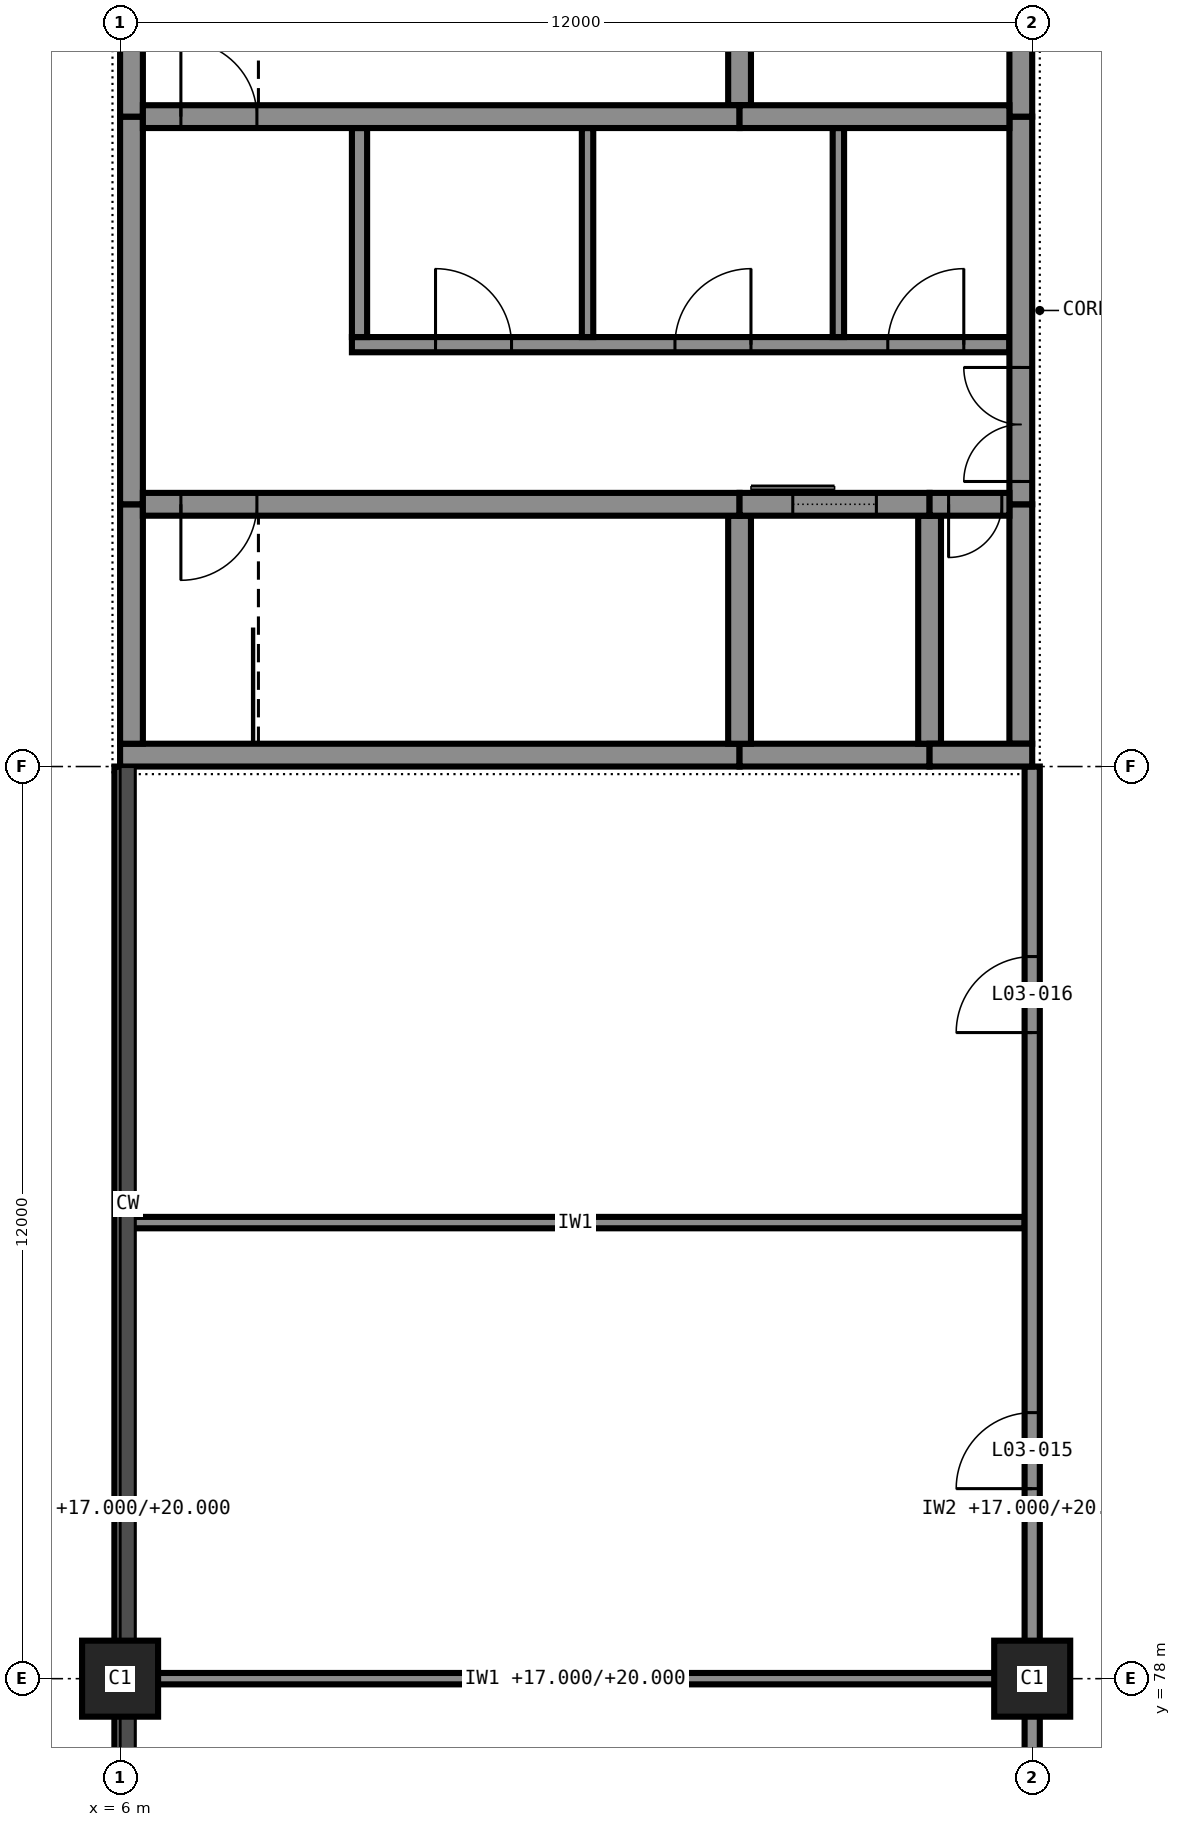
"""IFC4 building model, lengths in metres.
Left out: names, types, materials, properties, quantities, classifications, styles, units other than length and angle.
Written with IfcOpenShell. Run it as: python <this file> out.ifc"""

import sys

from ifc_helpers import new_model, si_unit, direction, frame, frame_2d, origin, origin_2d, place, context, subcontext, project, spatial, rectangle, extrude, element, fill, save


model = new_model("IFC4")
c1 = context("Model", 3, precision=1e-05, world=origin(), true_north=direction((0.0, 1.0)))
c2 = subcontext(c1, "Body", "Model", "MODEL_VIEW")
j1 = project(units=[si_unit("LENGTHUNIT", "METRE"), si_unit("PLANEANGLEUNIT", "RADIAN")], contexts=[c1])
p1 = place(None, origin())
s1 = spatial("IfcSite", under=j1, at=p1, CompositionType="ELEMENT")
p2 = place(p1, origin())
s2 = spatial("IfcBuilding", under=s1, at=p2, CompositionType="ELEMENT")
p3 = place(p2, frame((0.0, 0.0, 17.0)))
s3 = spatial("IfcBuildingStorey", under=s2, at=p3, CompositionType="ELEMENT", Elevation=17.0)
for number, where, z_axis, x_axis in (
    (1, (6.0, 78.0, 0.0), (0.0, 0.0, 1.0), (1.0, 0.0, 0.0)),
    (2, (18.0, 78.0, 0.0), (0.0, 0.0, 1.0), (1.0, 0.0, 0.0)),
):
    element("IfcColumn", number, at=place(p3, frame(where, z_axis=z_axis, x_axis=x_axis)), inside=s3, PredefinedType="COLUMN", context=c2, shape_type="SweptSolid", body=[
        extrude(rectangle(XDim=1.0, YDim=1.0, at=origin_2d()), origin(), (0.0, 0.0, 1.0), 4.0),
    ])
p4 = place(p3, frame((6.0, 90.15, 0.0), z_axis=(0.0, 0.0, 1.0), x_axis=(1.0, 0.0, 0.0)))
e3 = element("IfcWall", 3, at=p4, inside=s3, PredefinedType="SHEAR", context=c2, shape_type="SweptSolid", body=[
    extrude(rectangle(XDim=8.15, YDim=0.3, at=frame_2d((4.075, 0.0))), origin(), (0.0, 0.0, 1.0), 3.8),
])
p5 = place(p3, frame((14.15, 90.15, 0.0), z_axis=(0.0, 0.0, 1.0), x_axis=(1.0, 0.0, 0.0)))
e4 = element("IfcWall", 4, at=p5, inside=s3, PredefinedType="SHEAR", context=c2, shape_type="SweptSolid", body=[
    extrude(rectangle(XDim=2.5, YDim=0.3, at=frame_2d((1.25, 0.0))), origin(), (0.0, 0.0, 1.0), 3.8),
])
p6 = place(p3, frame((16.65, 90.15, 0.0), z_axis=(0.0, 0.0, 1.0), x_axis=(1.0, 0.0, 0.0)))
e5 = element("IfcWall", 5, at=p6, inside=s3, PredefinedType="SHEAR", context=c2, shape_type="SweptSolid", body=[
    extrude(rectangle(XDim=1.35, YDim=0.3, at=frame_2d((0.675, 0.0))), origin(), (0.0, 0.0, 1.0), 3.8),
])
p7 = place(p3, frame((6.3, 93.45, 0.0), z_axis=(0.0, 0.0, 1.0), x_axis=(1.0, 0.0, 0.0)))
e6 = element("IfcWall", 6, at=p7, inside=s3, PredefinedType="SHEAR", context=c2, shape_type="SweptSolid", body=[
    extrude(rectangle(XDim=7.85, YDim=0.3, at=frame_2d((3.925, 0.0))), origin(), (0.0, 0.0, 1.0), 3.8),
])
p8 = place(p7, frame((0.5, 0.0, 0.0)))
e7 = element("IfcOpeningElement", 7, at=p8, cuts=e6, PredefinedType="OPENING", context=c2, shape_type="SweptSolid", body=[
    extrude(rectangle(XDim=1.0, YDim=2.1, at=frame_2d((0.5, 1.05))), frame((0.0, 0.16, 0.0), z_axis=(0.0, -1.0, 0.0), x_axis=(1.0, 0.0, 0.0)), (0.0, 0.0, 1.0), 0.32),
])
p9 = place(p3, frame((14.15, 93.45, 0.0), z_axis=(0.0, 0.0, 1.0), x_axis=(1.0, 0.0, 0.0)))
e8 = element("IfcWall", 8, at=p9, inside=s3, PredefinedType="SHEAR", context=c2, shape_type="SweptSolid", body=[
    extrude(rectangle(XDim=2.5, YDim=0.3, at=frame_2d((1.25, 0.0))), origin(), (0.0, 0.0, 1.0), 3.8),
])
p10 = place(p9, frame((0.7, 0.0, 0.0)))
e9 = element("IfcOpeningElement", 9, at=p10, cuts=e8, PredefinedType="OPENING", context=c2, shape_type="SweptSolid", body=[
    extrude(rectangle(XDim=1.1, YDim=2.1, at=frame_2d((0.55, 1.05))), frame((0.0, 0.16, 0.0), z_axis=(0.0, -1.0, 0.0), x_axis=(1.0, 0.0, 0.0)), (0.0, 0.0, 1.0), 0.32),
])
p11 = place(p3, frame((16.65, 93.45, 0.0), z_axis=(0.0, 0.0, 1.0), x_axis=(1.0, 0.0, 0.0)))
e10 = element("IfcWall", 10, at=p11, inside=s3, PredefinedType="SHEAR", context=c2, shape_type="SweptSolid", body=[
    extrude(rectangle(XDim=1.05, YDim=0.3, at=frame_2d((0.525, 0.0))), origin(), (0.0, 0.0, 1.0), 3.8),
])
p12 = place(p11, frame((0.25, 0.0, 0.0)))
e11 = element("IfcOpeningElement", 11, at=p12, cuts=e10, PredefinedType="OPENING", context=c2, shape_type="SweptSolid", body=[
    extrude(rectangle(XDim=0.7, YDim=2.1, at=frame_2d((0.35, 1.05))), frame((0.0, 0.16, 0.0), z_axis=(0.0, -1.0, 0.0), x_axis=(1.0, 0.0, 0.0)), (0.0, 0.0, 1.0), 0.32),
])
p13 = place(p3, frame((6.3, 98.55, 0.0), z_axis=(0.0, 0.0, 1.0), x_axis=(1.0, 0.0, 0.0)))
e12 = element("IfcWall", 12, at=p13, inside=s3, PredefinedType="SHEAR", context=c2, shape_type="SweptSolid", body=[
    extrude(rectangle(XDim=7.85, YDim=0.3, at=frame_2d((3.925, 0.0))), origin(), (0.0, 0.0, 1.0), 3.8),
])
p14 = place(p13, frame((0.5, 0.0, 0.0)))
e13 = element("IfcOpeningElement", 13, at=p14, cuts=e12, PredefinedType="OPENING", context=c2, shape_type="SweptSolid", body=[
    extrude(rectangle(XDim=1.0, YDim=2.1, at=frame_2d((0.5, 1.05))), frame((0.0, 0.16, 0.0), z_axis=(0.0, -1.0, 0.0), x_axis=(1.0, 0.0, 0.0)), (0.0, 0.0, 1.0), 0.32),
])
p15 = place(p3, frame((14.15, 98.55, 0.0), z_axis=(0.0, 0.0, 1.0), x_axis=(1.0, 0.0, 0.0)))
e14 = element("IfcWall", 14, at=p15, inside=s3, PredefinedType="SHEAR", context=c2, shape_type="SweptSolid", body=[
    extrude(rectangle(XDim=3.55, YDim=0.3, at=frame_2d((1.775, 0.0))), origin(), (0.0, 0.0, 1.0), 3.8),
])
p16 = place(p3, frame((6.15, 90.3, 0.0), z_axis=(0.0, 0.0, 1.0), x_axis=(0.0, 1.0, 0.0)))
e15 = element("IfcWall", 15, at=p16, inside=s3, PredefinedType="SHEAR", context=c2, shape_type="SweptSolid", body=[
    extrude(rectangle(XDim=3.15, YDim=0.3, at=frame_2d((1.575, 0.0))), origin(), (0.0, 0.0, 1.0), 3.8),
])
p17 = place(p3, frame((6.15, 93.45, 0.0), z_axis=(0.0, 0.0, 1.0), x_axis=(0.0, 1.0, 0.0)))
e16 = element("IfcWall", 16, at=p17, inside=s3, PredefinedType="SHEAR", context=c2, shape_type="SweptSolid", body=[
    extrude(rectangle(XDim=5.1, YDim=0.3, at=frame_2d((2.55, 0.0))), origin(), (0.0, 0.0, 1.0), 3.8),
])
p18 = place(p3, frame((6.15, 98.55, 0.0), z_axis=(0.0, 0.0, 1.0), x_axis=(0.0, 1.0, 0.0)))
e17 = element("IfcWall", 17, at=p18, inside=s3, PredefinedType="SHEAR", context=c2, shape_type="SweptSolid", body=[
    extrude(rectangle(XDim=3.45, YDim=0.3, at=frame_2d((1.725, 0.0))), origin(), (0.0, 0.0, 1.0), 3.8),
])
p19 = place(p3, frame((17.85, 90.3, 0.0), z_axis=(0.0, 0.0, 1.0), x_axis=(0.0, 1.0, 0.0)))
e18 = element("IfcWall", 18, at=p19, inside=s3, PredefinedType="SHEAR", context=c2, shape_type="SweptSolid", body=[
    extrude(rectangle(XDim=3.15, YDim=0.3, at=frame_2d((1.575, 0.0))), origin(), (0.0, 0.0, 1.0), 3.8),
])
p20 = place(p3, frame((17.85, 93.45, 0.0), z_axis=(0.0, 0.0, 1.0), x_axis=(0.0, 1.0, 0.0)))
e19 = element("IfcWall", 19, at=p20, inside=s3, PredefinedType="SHEAR", context=c2, shape_type="SweptSolid", body=[
    extrude(rectangle(XDim=5.1, YDim=0.3, at=frame_2d((2.55, 0.0))), origin(), (0.0, 0.0, 1.0), 3.8),
])
p21 = place(p20, frame((0.3, 0.0, 0.0)))
e20 = element("IfcOpeningElement", 20, at=p21, cuts=e19, PredefinedType="OPENING", context=c2, shape_type="SweptSolid", body=[
    extrude(rectangle(XDim=1.5, YDim=2.1, at=frame_2d((0.75, 1.05))), frame((0.0, 0.16, 0.0), z_axis=(0.0, -1.0, 0.0), x_axis=(1.0, 0.0, 0.0)), (0.0, 0.0, 1.0), 0.32),
])
p22 = place(p3, frame((17.85, 98.55, 0.0), z_axis=(0.0, 0.0, 1.0), x_axis=(0.0, 1.0, 0.0)))
e21 = element("IfcWall", 21, at=p22, inside=s3, PredefinedType="SHEAR", context=c2, shape_type="SweptSolid", body=[
    extrude(rectangle(XDim=3.15, YDim=0.3, at=frame_2d((1.575, 0.0))), origin(), (0.0, 0.0, 1.0), 3.8),
])
p23 = place(p22, frame((1.15, 0.0, 0.0)))
e22 = element("IfcOpeningElement", 22, at=p23, cuts=e21, PredefinedType="OPENING", context=c2, shape_type="SweptSolid", body=[
    extrude(rectangle(XDim=1.0, YDim=2.1, at=frame_2d((0.5, 1.05))), frame((0.0, 0.16, 0.0), z_axis=(0.0, -1.0, 0.0), x_axis=(1.0, 0.0, 0.0)), (0.0, 0.0, 1.0), 0.32),
])
p24 = place(p3, frame((14.15, 90.3, 0.0), z_axis=(0.0, 0.0, 1.0), x_axis=(0.0, 1.0, 0.0)))
e23 = element("IfcWall", 23, at=p24, inside=s3, PredefinedType="SHEAR", context=c2, shape_type="SweptSolid", body=[
    extrude(rectangle(XDim=3.0, YDim=0.3, at=frame_2d((1.5, 0.0))), origin(), (0.0, 0.0, 1.0), 3.8),
])
p25 = place(p3, frame((14.15, 98.7, 0.0), z_axis=(0.0, 0.0, 1.0), x_axis=(0.0, 1.0, 0.0)))
e24 = element("IfcWall", 24, at=p25, inside=s3, PredefinedType="SHEAR", context=c2, shape_type="SweptSolid", body=[
    extrude(rectangle(XDim=3.3, YDim=0.3, at=frame_2d((1.65, 0.0))), origin(), (0.0, 0.0, 1.0), 3.8),
])
p26 = place(p3, frame((16.65, 90.3, 0.0), z_axis=(0.0, 0.0, 1.0), x_axis=(0.0, 1.0, 0.0)))
e25 = element("IfcWall", 25, at=p26, inside=s3, PredefinedType="SHEAR", context=c2, shape_type="SweptSolid", body=[
    extrude(rectangle(XDim=3.0, YDim=0.3, at=frame_2d((1.5, 0.0))), origin(), (0.0, 0.0, 1.0), 3.8),
])
p27 = place(p3, frame((6.075, 78.0, 0.0), z_axis=(0.0, 0.0, 1.0), x_axis=(1.0, 0.0, 0.0)))
e26 = element("IfcWall", 26, at=p27, inside=s3, PredefinedType="PARTITIONING", context=c2, shape_type="SweptSolid", body=[
    extrude(rectangle(XDim=11.825, YDim=0.15, at=frame_2d((5.913, 0.0))), origin(), (0.0, 0.0, 1.0), 3.0),
])
p28 = place(p3, frame((6.075, 84.0, 0.0), z_axis=(0.0, 0.0, 1.0), x_axis=(1.0, 0.0, 0.0)))
e27 = element("IfcWall", 27, at=p28, inside=s3, PredefinedType="PARTITIONING", context=c2, shape_type="SweptSolid", body=[
    extrude(rectangle(XDim=11.825, YDim=0.15, at=frame_2d((5.913, 0.0))), origin(), (0.0, 0.0, 1.0), 3.8),
])
p29 = place(p3, frame((9.05, 95.55, 0.0), z_axis=(0.0, 0.0, 1.0), x_axis=(1.0, 0.0, 0.0)))
e28 = element("IfcWall", 28, at=p29, inside=s3, PredefinedType="PARTITIONING", context=c2, shape_type="SweptSolid", body=[
    extrude(rectangle(XDim=8.65, YDim=0.2, at=frame_2d((4.325, 0.0))), origin(), (0.0, 0.0, 1.0), 3.8),
])
p30 = place(p29, frame((1.1, 0.0, 0.0)))
e29 = element("IfcOpeningElement", 29, at=p30, cuts=e28, PredefinedType="OPENING", context=c2, shape_type="SweptSolid", body=[
    extrude(rectangle(XDim=1.0, YDim=2.1, at=frame_2d((0.5, 1.05))), frame((0.0, 0.11, 0.0), z_axis=(0.0, -1.0, 0.0), x_axis=(1.0, 0.0, 0.0)), (0.0, 0.0, 1.0), 0.22),
])
p31 = place(p29, frame((4.25, 0.0, 0.0)))
e30 = element("IfcOpeningElement", 30, at=p31, cuts=e28, PredefinedType="OPENING", context=c2, shape_type="SweptSolid", body=[
    extrude(rectangle(XDim=1.0, YDim=2.1, at=frame_2d((0.5, 1.05))), frame((0.0, 0.11, 0.0), z_axis=(0.0, -1.0, 0.0), x_axis=(1.0, 0.0, 0.0)), (0.0, 0.0, 1.0), 0.22),
])
p32 = place(p29, frame((7.05, 0.0, 0.0)))
e31 = element("IfcOpeningElement", 31, at=p32, cuts=e28, PredefinedType="OPENING", context=c2, shape_type="SweptSolid", body=[
    extrude(rectangle(XDim=1.0, YDim=2.1, at=frame_2d((0.5, 1.05))), frame((0.0, 0.11, 0.0), z_axis=(0.0, -1.0, 0.0), x_axis=(1.0, 0.0, 0.0)), (0.0, 0.0, 1.0), 0.22),
])
p33 = place(p3, frame((6.0, 54.0, 0.0), z_axis=(0.0, 0.0, 1.0), x_axis=(0.0, 1.0, 0.0)))
e32 = element("IfcWall", 32, at=p33, inside=s3, PredefinedType="PARTITIONING", context=c2, shape_type="SweptSolid", body=[
    extrude(rectangle(XDim=36.0, YDim=0.15, at=frame_2d((18.0, 0.0))), origin(), (0.0, 0.0, 1.0), 3.0),
])
p34 = place(p3, frame((9.15, 95.65, 0.0), z_axis=(0.0, 0.0, 1.0), x_axis=(0.0, 1.0, 0.0)))
e33 = element("IfcWall", 33, at=p34, inside=s3, PredefinedType="PARTITIONING", context=c2, shape_type="SweptSolid", body=[
    extrude(rectangle(XDim=2.75, YDim=0.2, at=frame_2d((1.375, 0.0))), origin(), (0.0, 0.0, 1.0), 3.8),
])
for number, where, z_axis, x_axis in (
    (34, (12.15, 95.65, 0.0), (0.0, 0.0, 1.0), (0.0, 1.0, 0.0)),
    (35, (15.45, 95.65, 0.0), (0.0, 0.0, 1.0), (0.0, 1.0, 0.0)),
):
    element("IfcWall", number, at=place(p3, frame(where, z_axis=z_axis, x_axis=x_axis)), inside=s3, PredefinedType="PARTITIONING", context=c2, shape_type="SweptSolid", body=[
        extrude(rectangle(XDim=2.75, YDim=0.15, at=frame_2d((1.375, 0.0))), origin(), (0.0, 0.0, 1.0), 3.8),
    ])
p35 = place(p3, frame((18.0, 54.0, 0.0), z_axis=(0.0, 0.0, 1.0), x_axis=(0.0, 1.0, 0.0)))
e36 = element("IfcWall", 36, at=p35, inside=s3, PredefinedType="PARTITIONING", context=c2, shape_type="SweptSolid", body=[
    extrude(rectangle(XDim=36.0, YDim=0.2, at=frame_2d((18.0, 0.0))), origin(), (0.0, 0.0, 1.0), 3.0),
])
p36 = place(p35, frame((2.5, 0.0, 0.0)))
e37 = element("IfcOpeningElement", 37, at=p36, cuts=e36, PredefinedType="OPENING", context=c2, shape_type="SweptSolid", body=[
    extrude(rectangle(XDim=1.0, YDim=2.1, at=frame_2d((0.5, 1.05))), frame((0.0, 0.11, 0.0), z_axis=(0.0, -1.0, 0.0), x_axis=(1.0, 0.0, 0.0)), (0.0, 0.0, 1.0), 0.22),
])
p37 = place(p35, frame((8.5, 0.0, 0.0)))
e38 = element("IfcOpeningElement", 38, at=p37, cuts=e36, PredefinedType="OPENING", context=c2, shape_type="SweptSolid", body=[
    extrude(rectangle(XDim=1.0, YDim=2.1, at=frame_2d((0.5, 1.05))), frame((0.0, 0.11, 0.0), z_axis=(0.0, -1.0, 0.0), x_axis=(1.0, 0.0, 0.0)), (0.0, 0.0, 1.0), 0.22),
])
p38 = place(p35, frame((14.5, 0.0, 0.0)))
e39 = element("IfcOpeningElement", 39, at=p38, cuts=e36, PredefinedType="OPENING", context=c2, shape_type="SweptSolid", body=[
    extrude(rectangle(XDim=1.0, YDim=2.1, at=frame_2d((0.5, 1.05))), frame((0.0, 0.11, 0.0), z_axis=(0.0, -1.0, 0.0), x_axis=(1.0, 0.0, 0.0)), (0.0, 0.0, 1.0), 0.22),
])
p39 = place(p35, frame((20.5, 0.0, 0.0)))
e40 = element("IfcOpeningElement", 40, at=p39, cuts=e36, PredefinedType="OPENING", context=c2, shape_type="SweptSolid", body=[
    extrude(rectangle(XDim=1.0, YDim=2.1, at=frame_2d((0.5, 1.05))), frame((0.0, 0.11, 0.0), z_axis=(0.0, -1.0, 0.0), x_axis=(1.0, 0.0, 0.0)), (0.0, 0.0, 1.0), 0.22),
])
p40 = place(p35, frame((26.5, 0.0, 0.0)))
e41 = element("IfcOpeningElement", 41, at=p40, cuts=e36, PredefinedType="OPENING", context=c2, shape_type="SweptSolid", body=[
    extrude(rectangle(XDim=1.0, YDim=2.1, at=frame_2d((0.5, 1.05))), frame((0.0, 0.11, 0.0), z_axis=(0.0, -1.0, 0.0), x_axis=(1.0, 0.0, 0.0)), (0.0, 0.0, 1.0), 0.22),
])
p41 = place(p35, frame((32.5, 0.0, 0.0)))
e42 = element("IfcOpeningElement", 42, at=p41, cuts=e36, PredefinedType="OPENING", context=c2, shape_type="SweptSolid", body=[
    extrude(rectangle(XDim=1.0, YDim=2.1, at=frame_2d((0.5, 1.05))), frame((0.0, 0.11, 0.0), z_axis=(0.0, -1.0, 0.0), x_axis=(1.0, 0.0, 0.0)), (0.0, 0.0, 1.0), 0.22),
])
p42 = place(p40, origin())
e43 = element("IfcDoor", 43, at=p42, inside=s3, OperationType="SINGLE_SWING_RIGHT", PredefinedType="DOOR", context=c2, shape_type="SweptSolid", body=[
    extrude(rectangle(XDim=1.0, YDim=2.1, at=frame_2d((0.5, 1.05))), frame((0.0, 0.025, 0.0), z_axis=(0.0, -1.0, 0.0), x_axis=(1.0, 0.0, 0.0)), (0.0, 0.0, 1.0), 0.05),
])
fill(e41, e43)
p43 = place(p41, origin())
e44 = element("IfcDoor", 44, at=p43, inside=s3, OperationType="SINGLE_SWING_RIGHT", PredefinedType="DOOR", context=c2, shape_type="SweptSolid", body=[
    extrude(rectangle(XDim=1.0, YDim=2.1, at=frame_2d((0.5, 1.05))), frame((0.0, 0.025, 0.0), z_axis=(0.0, -1.0, 0.0), x_axis=(1.0, 0.0, 0.0)), (0.0, 0.0, 1.0), 0.05),
])
fill(e42, e44)
p44 = place(p8, frame((1.0, 0.0, 0.0), z_axis=(0.0, 0.0, 1.0), x_axis=(-1.0, 0.0, 0.0)))
e45 = element("IfcDoor", 45, at=p44, inside=s3, OperationType="SINGLE_SWING_LEFT", PredefinedType="DOOR", context=c2, shape_type="SweptSolid", body=[
    extrude(rectangle(XDim=1.0, YDim=2.1, at=frame_2d((0.5, 1.05))), frame((0.0, 0.025, 0.0), z_axis=(0.0, -1.0, 0.0), x_axis=(1.0, 0.0, 0.0)), (0.0, 0.0, 1.0), 0.05),
])
fill(e7, e45)
p45 = place(p10, origin())
e46 = element("IfcDoor", 46, at=p45, inside=s3, OperationType="SLIDING_TO_LEFT", PredefinedType="DOOR", context=c2, shape_type="SweptSolid", body=[
    extrude(rectangle(XDim=1.1, YDim=2.1, at=frame_2d((0.55, 1.05))), frame((0.0, 0.025, 0.0), z_axis=(0.0, -1.0, 0.0), x_axis=(1.0, 0.0, 0.0)), (0.0, 0.0, 1.0), 0.05),
])
fill(e9, e46)
p46 = place(p12, frame((0.7, 0.0, 0.0), z_axis=(0.0, 0.0, 1.0), x_axis=(-1.0, 0.0, 0.0)))
e47 = element("IfcDoor", 47, at=p46, inside=s3, OperationType="SINGLE_SWING_LEFT", PredefinedType="DOOR", context=c2, shape_type="SweptSolid", body=[
    extrude(rectangle(XDim=0.7, YDim=2.1, at=frame_2d((0.35, 1.05))), frame((0.0, 0.025, 0.0), z_axis=(0.0, -1.0, 0.0), x_axis=(1.0, 0.0, 0.0)), (0.0, 0.0, 1.0), 0.05),
])
fill(e11, e47)
p47 = place(p21, origin())
e48 = element("IfcDoor", 48, at=p47, inside=s3, OperationType="DOUBLE_DOOR_SINGLE_SWING", PredefinedType="DOOR", context=c2, shape_type="SweptSolid", body=[
    extrude(rectangle(XDim=1.5, YDim=2.1, at=frame_2d((0.75, 1.05))), frame((0.0, 0.025, 0.0), z_axis=(0.0, -1.0, 0.0), x_axis=(1.0, 0.0, 0.0)), (0.0, 0.0, 1.0), 0.05),
])
fill(e20, e48)
p48 = place(p30, origin())
e49 = element("IfcDoor", 49, at=p48, inside=s3, OperationType="SINGLE_SWING_RIGHT", PredefinedType="DOOR", context=c2, shape_type="SweptSolid", body=[
    extrude(rectangle(XDim=1.0, YDim=2.1, at=frame_2d((0.5, 1.05))), frame((0.0, 0.025, 0.0), z_axis=(0.0, -1.0, 0.0), x_axis=(1.0, 0.0, 0.0)), (0.0, 0.0, 1.0), 0.05),
])
fill(e29, e49)
p49 = place(p31, origin())
e50 = element("IfcDoor", 50, at=p49, inside=s3, OperationType="SINGLE_SWING_LEFT", PredefinedType="DOOR", context=c2, shape_type="SweptSolid", body=[
    extrude(rectangle(XDim=1.0, YDim=2.1, at=frame_2d((0.5, 1.05))), frame((0.0, 0.025, 0.0), z_axis=(0.0, -1.0, 0.0), x_axis=(1.0, 0.0, 0.0)), (0.0, 0.0, 1.0), 0.05),
])
fill(e30, e50)
p50 = place(p32, origin())
e51 = element("IfcDoor", 51, at=p50, inside=s3, OperationType="SINGLE_SWING_LEFT", PredefinedType="DOOR", context=c2, shape_type="SweptSolid", body=[
    extrude(rectangle(XDim=1.0, YDim=2.1, at=frame_2d((0.5, 1.05))), frame((0.0, 0.025, 0.0), z_axis=(0.0, -1.0, 0.0), x_axis=(1.0, 0.0, 0.0)), (0.0, 0.0, 1.0), 0.05),
])
fill(e31, e51)
p51 = place(p14, origin())
e52 = element("IfcDoor", 52, at=p51, inside=s3, OperationType="SINGLE_SWING_RIGHT", PredefinedType="DOOR", context=c2, shape_type="SweptSolid", body=[
    extrude(rectangle(XDim=1.0, YDim=2.1, at=frame_2d((0.5, 1.05))), frame((0.0, 0.025, 0.0), z_axis=(0.0, -1.0, 0.0), x_axis=(1.0, 0.0, 0.0)), (0.0, 0.0, 1.0), 0.05),
])
fill(e13, e52)
save(model, sys.argv[1])
